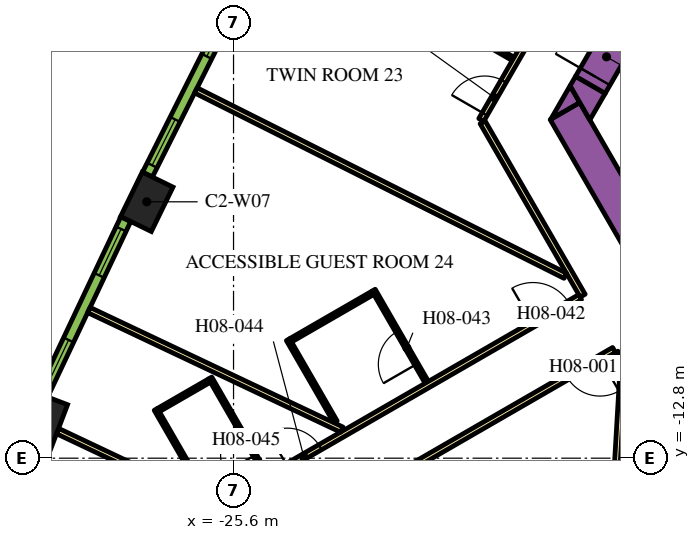
"""IFC4 building model, lengths in metres.
Left out: names, types, materials, properties, quantities, classifications, styles, units other than length and angle.
Written with IfcOpenShell. Run it as: python <this file> out.ifc"""

import sys

from ifc_helpers import new_model, si_unit, direction, frame, frame_2d, origin, origin_2d, place, context, subcontext, project, spatial, polyline, rectangle, outline, extrude, element, fill, save


model = new_model("IFC4")
c1 = context("Model", 3, precision=1e-05, world=origin(), true_north=direction((0.0, 1.0)))
c2 = subcontext(c1, "Body", "Model", "MODEL_VIEW")
j1 = project(units=[si_unit("LENGTHUNIT", "METRE"), si_unit("PLANEANGLEUNIT", "RADIAN")], contexts=[c1])
p1 = place(None, origin())
s1 = spatial("IfcSite", under=j1, at=p1, CompositionType="ELEMENT")
p2 = place(p1, origin())
s2 = spatial("IfcBuilding", under=s1, at=p2, CompositionType="ELEMENT")
p3 = place(p2, frame((0.0, 0.0, 107.1)))
s3 = spatial("IfcBuildingStorey", under=s2, at=p3, CompositionType="ELEMENT", Elevation=107.1)
for number, where, z_axis, x_axis in (
    (1, (-27.883, -6.054, 0.0), (0.0, 0.0, 1.0), (-0.438, -0.899, 0.0)),
    (2, (-30.619, -11.839, 0.0), (0.0, 0.0, 1.0), (-0.355, -0.935, 0.0)),
):
    element("IfcColumn", number, at=place(p3, frame(where, z_axis=z_axis, x_axis=x_axis)), inside=s3, PredefinedType="COLUMN", context=c2, shape_type="SweptSolid", body=[
        extrude(rectangle(XDim=1.3, YDim=0.9, at=origin_2d()), origin(), (0.0, 0.0, 1.0), 3.9),
    ])
p4 = place(p3, frame((-12.134, -11.883, 0.0), z_axis=(0.0, 0.0, 1.0), x_axis=(-0.500005339912, 0.866022320763, 0.0)))
e3 = element("IfcWall", 3, at=p4, inside=s3, PredefinedType="SOLIDWALL", context=c2, shape_type="SweptSolid", body=[
    extrude(rectangle(XDim=9.488, YDim=0.9, at=frame_2d((4.744, 0.0))), origin(), (0.0, 0.0, 1.0), 3.9),
])
p5 = place(p3, origin())
e4 = element("IfcWall", 4, at=p5, inside=s3, PredefinedType="SOLIDWALL", context=c2, shape_type="SweptSolid", body=[
    extrude(outline(polyline([(-16.489, -3.44), (-17.251, -3.88), (-16.743, -3.0), (-16.489, -3.44)])), origin(), (0.0, 0.0, 1.0), 3.9),
])
e5 = element("IfcWall", 5, at=p5, inside=s3, PredefinedType="SOLIDWALL", context=c2, shape_type="SweptSolid", body=[
    extrude(outline(polyline([(-15.82, -3.201), (-16.223, -3.9), (-16.743, -3.0), (-16.599, -2.751), (-15.82, -3.201)])), origin(), (0.0, 0.0, 1.0), 3.9),
])
p6 = place(p3, frame((-16.209, -2.976, 0.0), z_axis=(0.0, 0.0, 1.0), x_axis=(0.499954529098, 0.86605165483, 0.0)))
e6 = element("IfcWall", 6, at=p6, inside=s3, PredefinedType="SOLIDWALL", context=c2, shape_type="SweptSolid", body=[
    extrude(rectangle(XDim=1.7, YDim=0.9, at=frame_2d((0.85, 0.0))), origin(), (0.0, 0.0, 1.0), 3.9),
])
p7 = place(p6, frame((0.25, 0.0, 0.0)))
e7 = element("IfcOpeningElement", 7, at=p7, cuts=e6, PredefinedType="OPENING", context=c2, shape_type="SweptSolid", body=[
    extrude(rectangle(XDim=1.2, YDim=2.1, at=frame_2d((0.6, 1.05))), frame((0.0, 0.46, 0.0), z_axis=(0.0, -1.0, 0.0), x_axis=(1.0, 0.0, 0.0)), (0.0, 0.0, 1.0), 0.92),
])
p8 = place(p3, frame((-19.081, -3.9, 0.0), z_axis=(0.0, 0.0, 1.0), x_axis=(0.499998313975, 0.866026377209, 0.0)))
e8 = element("IfcWall", 8, at=p8, inside=s3, PredefinedType="PARTITIONING", context=c2, shape_type="SweptSolid", body=[
    extrude(rectangle(XDim=25.766, YDim=0.15, at=frame_2d((12.883, 0.0))), origin(), (0.0, 0.0, 1.0), 2.75),
])
p9 = place(p8, frame((19.306, 0.0, 0.0)))
e9 = element("IfcOpeningElement", 9, at=p9, cuts=e8, PredefinedType="OPENING", context=c2, shape_type="SweptSolid", body=[
    extrude(rectangle(XDim=1.0, YDim=2.1, at=frame_2d((0.5, 1.05))), frame((0.0, 0.085, 0.0), z_axis=(0.0, -1.0, 0.0), x_axis=(1.0, 0.0, 0.0)), (0.0, 0.0, 1.0), 0.17),
])
p10 = place(p8, frame((18.0, 0.0, 0.0)))
e10 = element("IfcOpeningElement", 10, at=p10, cuts=e8, PredefinedType="OPENING", context=c2, shape_type="SweptSolid", body=[
    extrude(rectangle(XDim=1.0, YDim=2.1, at=frame_2d((0.5, 1.05))), frame((0.0, 0.085, 0.0), z_axis=(0.0, -1.0, 0.0), x_axis=(1.0, 0.0, 0.0)), (0.0, 0.0, 1.0), 0.17),
])
p11 = place(p8, frame((6.838, 0.0, 0.0)))
e11 = element("IfcOpeningElement", 11, at=p11, cuts=e8, PredefinedType="OPENING", context=c2, shape_type="SweptSolid", body=[
    extrude(rectangle(XDim=1.0, YDim=2.1, at=frame_2d((0.5, 1.05))), frame((0.0, 0.085, 0.0), z_axis=(0.0, -1.0, 0.0), x_axis=(1.0, 0.0, 0.0)), (0.0, 0.0, 1.0), 0.17),
])
p12 = place(p8, frame((4.674, 0.0, 0.0)))
e12 = element("IfcOpeningElement", 12, at=p12, cuts=e8, PredefinedType="OPENING", context=c2, shape_type="SweptSolid", body=[
    extrude(rectangle(XDim=0.9, YDim=2.1, at=frame_2d((0.45, 1.05))), frame((0.0, 0.085, 0.0), z_axis=(0.0, -1.0, 0.0), x_axis=(1.0, 0.0, 0.0)), (0.0, 0.0, 1.0), 0.17),
])
p13 = place(p8, frame((0.18, 0.0, 0.0)))
e13 = element("IfcOpeningElement", 13, at=p13, cuts=e8, PredefinedType="OPENING", context=c2, shape_type="SweptSolid", body=[
    extrude(rectangle(XDim=1.0, YDim=2.1, at=frame_2d((0.5, 1.05))), frame((0.0, 0.085, 0.0), z_axis=(0.0, -1.0, 0.0), x_axis=(1.0, 0.0, 0.0)), (0.0, 0.0, 1.0), 0.17),
])
p14 = place(p3, frame((-16.412, -8.523, 0.0), z_axis=(0.0, 0.0, 1.0), x_axis=(-0.500001929737, 0.866024289647, 0.0)))
e14 = element("IfcWall", 14, at=p14, inside=s3, PredefinedType="PARTITIONING", context=c2, shape_type="SweptSolid", body=[
    extrude(rectangle(XDim=5.268, YDim=0.15, at=frame_2d((2.634, 0.0))), origin(), (0.0, 0.0, 1.0), 2.75),
])
p15 = place(p3, frame((-28.211, -15.335, 0.0), z_axis=(0.0, 0.0, 1.0), x_axis=(0.866025884867, 0.49999916674, 0.0)))
e15 = element("IfcWall", 15, at=p15, inside=s3, PredefinedType="PARTITIONING", context=c2, shape_type="SweptSolid", body=[
    extrude(rectangle(XDim=13.543, YDim=0.15, at=frame_2d((6.772, 0.0))), origin(), (0.0, 0.0, 1.0), 2.75),
])
p16 = place(p15, frame((12.114, 0.0, 0.0)))
e16 = element("IfcOpeningElement", 16, at=p16, cuts=e15, PredefinedType="OPENING", context=c2, shape_type="SweptSolid", body=[
    extrude(rectangle(XDim=1.1, YDim=2.1, at=frame_2d((0.55, 1.05))), frame((0.0, 0.085, 0.0), z_axis=(0.0, -1.0, 0.0), x_axis=(1.0, 0.0, 0.0)), (0.0, 0.0, 1.0), 0.17),
])
p17 = place(p15, frame((4.65, 0.0, 0.0)))
e17 = element("IfcOpeningElement", 17, at=p17, cuts=e15, PredefinedType="OPENING", context=c2, shape_type="SweptSolid", body=[
    extrude(rectangle(XDim=1.0, YDim=2.1, at=frame_2d((0.5, 1.05))), frame((0.0, 0.085, 0.0), z_axis=(0.0, -1.0, 0.0), x_axis=(1.0, 0.0, 0.0)), (0.0, 0.0, 1.0), 0.17),
])
p18 = place(p3, frame((-15.587, -9.952, 0.0), z_axis=(0.0, 0.0, 1.0), x_axis=(-0.866017869832, -0.500013048961, 0.0)))
e18 = element("IfcWall", 18, at=p18, inside=s3, PredefinedType="PARTITIONING", context=c2, shape_type="SweptSolid", body=[
    extrude(rectangle(XDim=13.624, YDim=0.15, at=frame_2d((6.812, 0.0))), origin(), (0.0, 0.0, 1.0), 2.75),
])
p19 = place(p18, frame((0.427, 0.0, 0.0)))
e19 = element("IfcOpeningElement", 19, at=p19, cuts=e18, PredefinedType="OPENING", context=c2, shape_type="SweptSolid", body=[
    extrude(rectangle(XDim=1.0, YDim=2.1, at=frame_2d((0.5, 1.05))), frame((0.0, 0.085, 0.0), z_axis=(0.0, -1.0, 0.0), x_axis=(1.0, 0.0, 0.0)), (0.0, 0.0, 1.0), 0.17),
])
p20 = place(p3, frame((-12.918, -14.575, 0.0), z_axis=(0.0, 0.0, 1.0), x_axis=(-0.500009150678, 0.866020120573, 0.0)))
e20 = element("IfcWall", 20, at=p20, inside=s3, PredefinedType="PARTITIONING", context=c2, shape_type="SweptSolid", body=[
    extrude(rectangle(XDim=5.258, YDim=0.15, at=frame_2d((2.629, 0.0))), origin(), (0.0, 0.0, 1.0), 2.75),
])
p21 = place(p3, frame((-30.231, -12.085, 0.0), z_axis=(0.0, 0.0, 1.0), x_axis=(0.904001132572, -0.427530060122, 0.0)))
e21 = element("IfcWall", 21, at=p21, inside=s3, PredefinedType="PARTITIONING", context=c2, shape_type="SweptSolid", body=[
    extrude(rectangle(XDim=4.51, YDim=0.15, at=frame_2d((2.255, 0.0))), origin(), (0.0, 0.0, 1.0), 2.75),
])
p22 = place(p3, frame((-29.406, -8.901, 0.0), z_axis=(0.0, 0.0, 1.0), x_axis=(0.904002363742, -0.427527456836, 0.0)))
e22 = element("IfcWall", 22, at=p22, inside=s3, PredefinedType="PARTITIONING", context=c2, shape_type="SweptSolid", body=[
    extrude(rectangle(XDim=7.362, YDim=0.15, at=frame_2d((3.681, 0.0))), origin(), (0.0, 0.0, 1.0), 2.75),
])
p23 = place(p3, frame((-26.591, -3.122, 0.0), z_axis=(0.0, 0.0, 1.0), x_axis=(0.893766213273, -0.448533115847, 0.0)))
e23 = element("IfcWall", 23, at=p23, inside=s3, PredefinedType="PARTITIONING", context=c2, shape_type="SweptSolid", body=[
    extrude(rectangle(XDim=10.875, YDim=0.15, at=frame_2d((5.438, 0.0))), origin(), (0.0, 0.0, 1.0), 2.75),
])
p24 = place(p3, frame((-15.999, -21.467, 0.0), z_axis=(0.0, 0.0, 1.0), x_axis=(0.058411453297, 0.998292593443, 0.0)))
e24 = element("IfcWall", 24, at=p24, inside=s3, PredefinedType="PARTITIONING", context=c2, shape_type="SweptSolid", body=[
    extrude(rectangle(XDim=10.875, YDim=0.15, at=frame_2d((5.438, 0.0))), origin(), (0.0, 0.0, 1.0), 2.75),
])
p25 = place(p3, frame((-20.492, -0.994, 0.0), z_axis=(0.0, 0.0, 1.0), x_axis=(0.865997922154, -0.500047596559, 0.0)))
e25 = element("IfcWall", 25, at=p25, inside=s3, PredefinedType="PARTITIONING", context=c2, shape_type="SweptSolid", body=[
    extrude(rectangle(XDim=2.6, YDim=0.1, at=frame_2d((1.3, 0.0))), origin(), (0.0, 0.0, 1.0), 2.75),
])
p26 = place(p25, frame((1.1, 0.0, 0.0)))
e26 = element("IfcOpeningElement", 26, at=p26, cuts=e25, PredefinedType="OPENING", context=c2, shape_type="SweptSolid", body=[
    extrude(rectangle(XDim=0.9, YDim=2.1, at=frame_2d((0.45, 1.05))), frame((0.0, 0.06, 0.0), z_axis=(0.0, -1.0, 0.0), x_axis=(1.0, 0.0, 0.0)), (0.0, 0.0, 1.0), 0.12),
])
p27 = place(p3, frame((-20.515, -10.805, 0.0), z_axis=(0.0, 0.0, 1.0), x_axis=(-0.49994636267, 0.866056369097, 0.0)))
e27 = element("IfcWall", 27, at=p27, inside=s3, PredefinedType="PARTITIONING", context=c2, shape_type="SweptSolid", body=[
    extrude(rectangle(XDim=2.8, YDim=0.1, at=frame_2d((1.4, 0.0))), origin(), (0.0, 0.0, 1.0), 2.75),
])
p28 = place(p27, frame((0.55, 0.0, 0.0)))
e28 = element("IfcOpeningElement", 28, at=p28, cuts=e27, PredefinedType="OPENING", context=c2, shape_type="SweptSolid", body=[
    extrude(rectangle(XDim=1.0, YDim=2.1, at=frame_2d((0.5, 1.05))), frame((0.0, 0.06, 0.0), z_axis=(0.0, -1.0, 0.0), x_axis=(1.0, 0.0, 0.0)), (0.0, 0.0, 1.0), 0.12),
])
for number, where, z_axis, x_axis in (
    (29, (-21.933, -8.448, 0.0), (0.0, 0.0, 1.0), (-0.866, -0.5, 0.0)),
    (30, (-22.916, -11.845, 0.0), (0.0, 0.0, 1.0), (-0.5, 0.866, 0.0)),
):
    element("IfcWall", number, at=place(p3, frame(where, z_axis=z_axis, x_axis=x_axis)), inside=s3, PredefinedType="PARTITIONING", context=c2, shape_type="SweptSolid", body=[
        extrude(rectangle(XDim=2.5, YDim=0.1, at=frame_2d((1.25, 0.0))), origin(), (0.0, 0.0, 1.0), 2.75),
    ])
p29 = place(p3, frame((-24.74, -13.244, 0.0), z_axis=(0.0, 0.0, 1.0), x_axis=(-0.500037662692, 0.866003658127, 0.0)))
e31 = element("IfcWall", 31, at=p29, inside=s3, PredefinedType="PARTITIONING", context=c2, shape_type="SweptSolid", body=[
    extrude(rectangle(XDim=2.95, YDim=0.1, at=frame_2d((1.475, 0.0))), origin(), (0.0, 0.0, 1.0), 2.75),
])
p30 = place(p29, frame((0.6, 0.0, 0.0)))
e32 = element("IfcOpeningElement", 32, at=p30, cuts=e31, PredefinedType="OPENING", context=c2, shape_type="SweptSolid", body=[
    extrude(rectangle(XDim=0.9, YDim=2.1, at=frame_2d((0.45, 1.05))), frame((0.0, 0.06, 0.0), z_axis=(0.0, -1.0, 0.0), x_axis=(1.0, 0.0, 0.0)), (0.0, 0.0, 1.0), 0.12),
])
p31 = place(p3, frame((-26.233, -10.758, 0.0), z_axis=(0.0, 0.0, 1.0), x_axis=(-0.866043940782, -0.499967891604, 0.0)))
e33 = element("IfcWall", 33, at=p31, inside=s3, PredefinedType="PARTITIONING", context=c2, shape_type="SweptSolid", body=[
    extrude(rectangle(XDim=1.55, YDim=0.1, at=frame_2d((0.775, 0.0))), origin(), (0.0, 0.0, 1.0), 2.75),
])
p32 = place(p3, frame((-26.319, -13.81, 0.0), z_axis=(0.0, 0.0, 1.0), x_axis=(-0.499953715521, 0.866052124492, 0.0)))
e34 = element("IfcWall", 34, at=p32, inside=s3, PredefinedType="PARTITIONING", context=c2, shape_type="SweptSolid", body=[
    extrude(rectangle(XDim=2.65, YDim=0.1, at=frame_2d((1.325, 0.0))), origin(), (0.0, 0.0, 1.0), 2.75),
])
p33 = place(p3, frame((-25.576, -0.778, 0.0), z_axis=(0.0, 0.0, 1.0), x_axis=(-0.448534297211, -0.893765620409, 0.0)))
e35 = element("IfcWall", 35, at=p33, inside=s3, PredefinedType="SOLIDWALL", context=c2, shape_type="SweptSolid", body=[
    extrude(rectangle(XDim=5.1, YDim=0.29, at=frame_2d((2.55, 0.0))), origin(), (0.0, 0.0, 1.0), 3.65),
])
p34 = place(p33, frame((0.272, 0.0, 0.9)))
e36 = element("IfcOpeningElement", 36, at=p34, cuts=e35, PredefinedType="OPENING", context=c2, shape_type="SweptSolid", body=[
    extrude(rectangle(XDim=1.35, YDim=2.15, at=frame_2d((0.675, 1.075))), frame((0.0, 0.155, 0.0), z_axis=(0.0, -1.0, 0.0), x_axis=(1.0, 0.0, 0.0)), (0.0, 0.0, 1.0), 0.31),
])
p35 = place(p33, frame((3.478, 0.0, 0.9)))
e37 = element("IfcOpeningElement", 37, at=p35, cuts=e35, PredefinedType="OPENING", context=c2, shape_type="SweptSolid", body=[
    extrude(rectangle(XDim=1.35, YDim=2.15, at=frame_2d((0.675, 1.075))), frame((0.0, 0.155, 0.0), z_axis=(0.0, -1.0, 0.0), x_axis=(1.0, 0.0, 0.0)), (0.0, 0.0, 1.0), 0.31),
])
p36 = place(p3, frame((-28.436, -6.511, 0.0), z_axis=(0.0, 0.0, 1.0), x_axis=(-0.427543726596, -0.903994669148, 0.0)))
e38 = element("IfcWall", 38, at=p36, inside=s3, PredefinedType="SOLIDWALL", context=c2, shape_type="SweptSolid", body=[
    extrude(rectangle(XDim=5.107, YDim=0.29, at=frame_2d((2.553, 0.0))), origin(), (0.0, 0.0, 1.0), 3.65),
])
p37 = place(p36, frame((0.285, 0.0, 0.9)))
e39 = element("IfcOpeningElement", 39, at=p37, cuts=e38, PredefinedType="OPENING", context=c2, shape_type="SweptSolid", body=[
    extrude(rectangle(XDim=1.35, YDim=2.15, at=frame_2d((0.675, 1.075))), frame((0.0, 0.155, 0.0), z_axis=(0.0, -1.0, 0.0), x_axis=(1.0, 0.0, 0.0)), (0.0, 0.0, 1.0), 0.31),
])
p38 = place(p36, frame((3.516, 0.0, 0.9)))
e40 = element("IfcOpeningElement", 40, at=p38, cuts=e38, PredefinedType="OPENING", context=c2, shape_type="SweptSolid", body=[
    extrude(rectangle(XDim=1.35, YDim=2.15, at=frame_2d((0.675, 1.075))), frame((0.0, 0.155, 0.0), z_axis=(0.0, -1.0, 0.0), x_axis=(1.0, 0.0, 0.0)), (0.0, 0.0, 1.0), 0.31),
])
p39 = place(p7, origin())
e41 = element("IfcDoor", 41, at=p39, inside=s3, OperationType="SINGLE_SWING_LEFT", PredefinedType="DOOR", context=c2, shape_type="SweptSolid", body=[
    extrude(rectangle(XDim=1.2, YDim=2.1, at=frame_2d((0.6, 1.05))), frame((0.0, 0.025, 0.0), z_axis=(0.0, -1.0, 0.0), x_axis=(1.0, 0.0, 0.0)), (0.0, 0.0, 1.0), 0.05),
])
fill(e7, e41)
p40 = place(p19, origin())
e42 = element("IfcDoor", 42, at=p40, inside=s3, OperationType="SINGLE_SWING_LEFT", PredefinedType="DOOR", context=c2, shape_type="SweptSolid", body=[
    extrude(rectangle(XDim=1.0, YDim=2.1, at=frame_2d((0.5, 1.05))), frame((0.0, 0.025, 0.0), z_axis=(0.0, -1.0, 0.0), x_axis=(1.0, 0.0, 0.0)), (0.0, 0.0, 1.0), 0.05),
])
fill(e19, e42)
p41 = place(p13, origin())
e43 = element("IfcDoor", 43, at=p41, inside=s3, OperationType="SINGLE_SWING_LEFT", PredefinedType="DOOR", context=c2, shape_type="SweptSolid", body=[
    extrude(rectangle(XDim=1.0, YDim=2.1, at=frame_2d((0.5, 1.05))), frame((0.0, 0.025, 0.0), z_axis=(0.0, -1.0, 0.0), x_axis=(1.0, 0.0, 0.0)), (0.0, 0.0, 1.0), 0.05),
])
fill(e13, e43)
p42 = place(p16, origin())
e44 = element("IfcDoor", 44, at=p42, inside=s3, OperationType="SINGLE_SWING_RIGHT", PredefinedType="DOOR", context=c2, shape_type="SweptSolid", body=[
    extrude(rectangle(XDim=1.1, YDim=2.1, at=frame_2d((0.55, 1.05))), frame((0.0, 0.025, 0.0), z_axis=(0.0, -1.0, 0.0), x_axis=(1.0, 0.0, 0.0)), (0.0, 0.0, 1.0), 0.05),
])
fill(e16, e44)
p43 = place(p28, origin())
e45 = element("IfcDoor", 45, at=p43, inside=s3, OperationType="SINGLE_SWING_RIGHT", PredefinedType="DOOR", context=c2, shape_type="SweptSolid", body=[
    extrude(rectangle(XDim=1.0, YDim=2.1, at=frame_2d((0.5, 1.05))), frame((0.0, 0.025, 0.0), z_axis=(0.0, -1.0, 0.0), x_axis=(1.0, 0.0, 0.0)), (0.0, 0.0, 1.0), 0.05),
])
fill(e28, e45)
p44 = place(p17, origin())
e46 = element("IfcDoor", 46, at=p44, inside=s3, OperationType="SINGLE_SWING_RIGHT", PredefinedType="DOOR", context=c2, shape_type="SweptSolid", body=[
    extrude(rectangle(XDim=1.0, YDim=2.1, at=frame_2d((0.5, 1.05))), frame((0.0, 0.025, 0.0), z_axis=(0.0, -1.0, 0.0), x_axis=(1.0, 0.0, 0.0)), (0.0, 0.0, 1.0), 0.05),
])
fill(e17, e46)
p45 = place(p30, origin())
e47 = element("IfcDoor", 47, at=p45, inside=s3, OperationType="SINGLE_SWING_LEFT", PredefinedType="DOOR", context=c2, shape_type="SweptSolid", body=[
    extrude(rectangle(XDim=0.9, YDim=2.1, at=frame_2d((0.45, 1.05))), frame((0.0, 0.025, 0.0), z_axis=(0.0, -1.0, 0.0), x_axis=(1.0, 0.0, 0.0)), (0.0, 0.0, 1.0), 0.05),
])
fill(e32, e47)
p46 = place(p34, origin())
e48 = element("IfcWindow", 48, at=p46, inside=s3, PartitioningType="DOUBLE_PANEL_VERTICAL", PredefinedType="WINDOW", context=c2, shape_type="SweptSolid", body=[
    extrude(rectangle(XDim=1.35, YDim=2.15, at=frame_2d((0.675, 1.075))), frame((0.0, 0.015, 0.0), z_axis=(0.0, -1.0, 0.0), x_axis=(1.0, 0.0, 0.0)), (0.0, 0.0, 1.0), 0.06),
])
fill(e36, e48)
p47 = place(p35, origin())
e49 = element("IfcWindow", 49, at=p47, inside=s3, PartitioningType="DOUBLE_PANEL_VERTICAL", PredefinedType="WINDOW", context=c2, shape_type="SweptSolid", body=[
    extrude(rectangle(XDim=1.35, YDim=2.15, at=frame_2d((0.675, 1.075))), frame((0.0, 0.015, 0.0), z_axis=(0.0, -1.0, 0.0), x_axis=(1.0, 0.0, 0.0)), (0.0, 0.0, 1.0), 0.06),
])
fill(e37, e49)
p48 = place(p37, origin())
e50 = element("IfcWindow", 50, at=p48, inside=s3, PartitioningType="DOUBLE_PANEL_VERTICAL", PredefinedType="WINDOW", context=c2, shape_type="SweptSolid", body=[
    extrude(rectangle(XDim=1.35, YDim=2.15, at=frame_2d((0.675, 1.075))), frame((0.0, 0.015, 0.0), z_axis=(0.0, -1.0, 0.0), x_axis=(1.0, 0.0, 0.0)), (0.0, 0.0, 1.0), 0.06),
])
fill(e39, e50)
p49 = place(p38, origin())
e51 = element("IfcWindow", 51, at=p49, inside=s3, PartitioningType="DOUBLE_PANEL_VERTICAL", PredefinedType="WINDOW", context=c2, shape_type="SweptSolid", body=[
    extrude(rectangle(XDim=1.35, YDim=2.15, at=frame_2d((0.675, 1.075))), frame((0.0, 0.015, 0.0), z_axis=(0.0, -1.0, 0.0), x_axis=(1.0, 0.0, 0.0)), (0.0, 0.0, 1.0), 0.06),
])
fill(e40, e51)
save(model, sys.argv[1])
